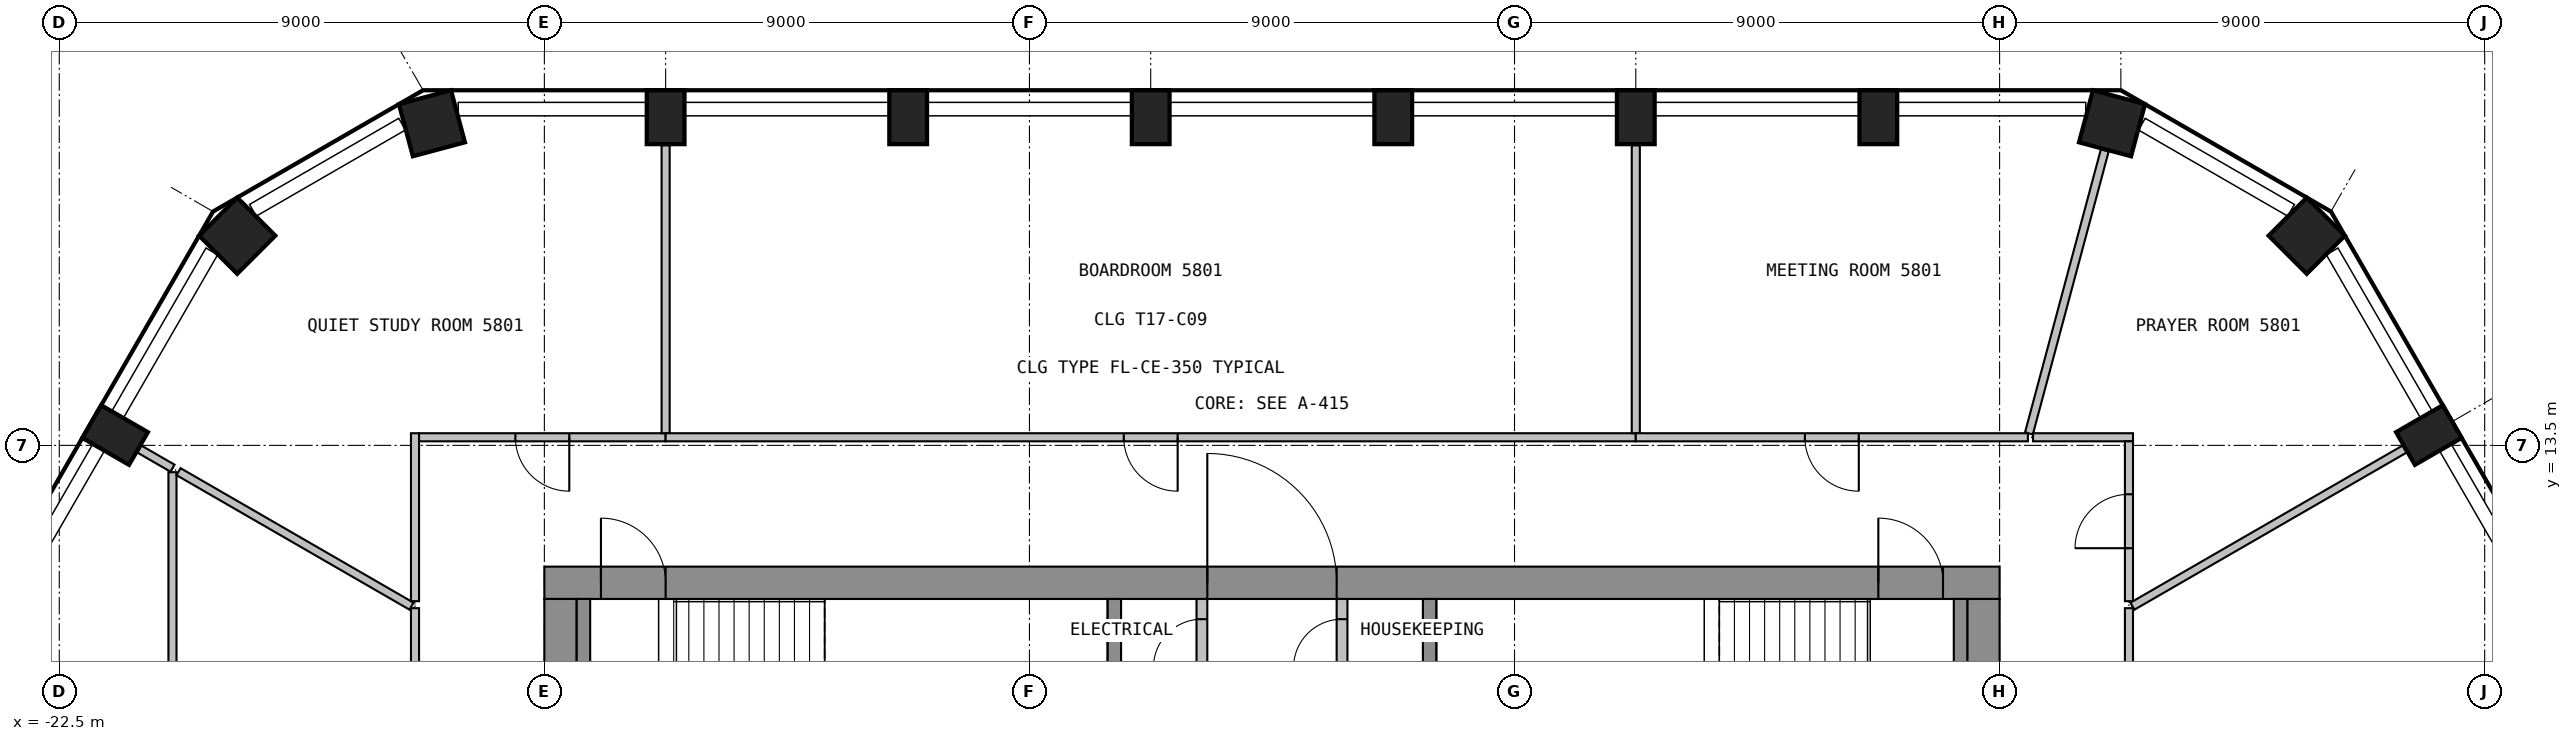
"""IFC4 building model, lengths in metres.
Left out: names, types, materials, properties, quantities, classifications, styles, units other than length and angle.
Written with IfcOpenShell. Run it as: python <this file> out.ifc"""

import sys

from ifc_helpers import new_model, si_unit, direction, frame, frame_2d, origin, origin_2d, place, context, subcontext, project, spatial, rectangle, extrude, element, fill, save


model = new_model("IFC4")
c1 = context("Model", 3, precision=1e-05, world=origin(), true_north=direction((0.0, 1.0)))
c2 = subcontext(c1, "Body", "Model", "MODEL_VIEW")
j1 = project(units=[si_unit("LENGTHUNIT", "METRE"), si_unit("PLANEANGLEUNIT", "RADIAN")], contexts=[c1])
p1 = place(None, origin())
s1 = spatial("IfcSite", under=j1, at=p1, CompositionType="ELEMENT")
p2 = place(p1, origin())
s2 = spatial("IfcBuilding", under=s1, at=p2, CompositionType="ELEMENT")
p3 = place(p2, frame((0.0, 0.0, 235.2)))
s3 = spatial("IfcBuildingStorey", under=s2, at=p3, CompositionType="ELEMENT", Elevation=235.2)
p4 = place(p3, frame((21.464, 13.691, 0.0), z_axis=(0.0, 0.0, 1.0), x_axis=(-0.5, 0.866025403784, 0.0)))
e1 = element("IfcColumn", 1, at=p4, inside=s3, PredefinedType="COLUMN", context=c2, shape_type="SweptSolid", body=[
    extrude(rectangle(XDim=0.7, YDim=1.0, at=origin_2d()), origin(), (0.0, 0.0, 1.0), 3.575),
])
for number, where, z_axis, x_axis in (
    (2, (19.199, 17.39, 0.0), (0.0, 0.0, 1.0), (-0.707, 0.707, 0.0)),
    (3, (15.586, 19.476, 0.0), (0.0, 0.0, 1.0), (-0.966, 0.259, 0.0)),
):
    element("IfcColumn", number, at=place(p3, frame(where, z_axis=z_axis, x_axis=x_axis)), inside=s3, PredefinedType="COLUMN", context=c2, shape_type="SweptSolid", body=[
        extrude(rectangle(XDim=1.0, YDim=1.0, at=origin_2d()), origin(), (0.0, 0.0, 1.0), 3.575),
    ])
for number, where, z_axis, x_axis in (
    (4, (11.25, 19.588, 0.0), (0.0, 0.0, 1.0), (-1.0, 0.0, 0.0)),
    (5, (6.75, 19.588, 0.0), (0.0, 0.0, 1.0), (-1.0, 0.0, 0.0)),
    (6, (2.25, 19.588, 0.0), (0.0, 0.0, 1.0), (-1.0, 0.0, 0.0)),
    (7, (-2.25, 19.588, 0.0), (0.0, 0.0, 1.0), (-1.0, 0.0, 0.0)),
    (8, (-6.75, 19.588, 0.0), (0.0, 0.0, 1.0), (-1.0, 0.0, 0.0)),
    (9, (-11.25, 19.588, 0.0), (0.0, 0.0, 1.0), (-1.0, 0.0, 0.0)),
):
    element("IfcColumn", number, at=place(p3, frame(where, z_axis=z_axis, x_axis=x_axis)), inside=s3, PredefinedType="COLUMN", context=c2, shape_type="SweptSolid", body=[
        extrude(rectangle(XDim=0.7, YDim=1.0, at=origin_2d()), origin(), (0.0, 0.0, 1.0), 3.575),
    ])
for number, where, z_axis, x_axis in (
    (10, (-15.586, 19.476, 0.0), (0.0, 0.0, 1.0), (-0.966, -0.259, 0.0)),
    (11, (-19.199, 17.39, 0.0), (0.0, 0.0, 1.0), (-0.707, -0.707, 0.0)),
):
    element("IfcColumn", number, at=place(p3, frame(where, z_axis=z_axis, x_axis=x_axis)), inside=s3, PredefinedType="COLUMN", context=c2, shape_type="SweptSolid", body=[
        extrude(rectangle(XDim=1.0, YDim=1.0, at=origin_2d()), origin(), (0.0, 0.0, 1.0), 3.575),
    ])
p5 = place(p3, frame((-21.464, 13.691, 0.0), z_axis=(0.0, 0.0, 1.0), x_axis=(-0.5, -0.866025403784, 0.0)))
e12 = element("IfcColumn", 12, at=p5, inside=s3, PredefinedType="COLUMN", context=c2, shape_type="SweptSolid", body=[
    extrude(rectangle(XDim=0.7, YDim=1.0, at=origin_2d()), origin(), (0.0, 0.0, 1.0), 3.575),
])
p6 = place(p3, frame((-13.5, 10.95, 0.0), z_axis=(0.0, 0.0, 1.0), x_axis=(1.0, 0.0, 0.0)))
e13 = element("IfcWall", 13, at=p6, inside=s3, PredefinedType="SHEAR", context=c2, shape_type="SweptSolid", body=[
    extrude(rectangle(XDim=27.0, YDim=0.6, at=frame_2d((13.5, 0.0))), origin(), (0.0, 0.0, 1.0), 3.575),
])
p7 = place(p6, frame((12.3, 0.0, 0.0)))
e14 = element("IfcOpeningElement", 14, at=p7, cuts=e13, PredefinedType="OPENING", context=c2, shape_type="SweptSolid", body=[
    extrude(rectangle(XDim=2.4, YDim=2.1, at=frame_2d((1.2, 1.05))), frame((0.0, 0.31, 0.0), z_axis=(0.0, -1.0, 0.0), x_axis=(1.0, 0.0, 0.0)), (0.0, 0.0, 1.0), 0.62),
])
p8 = place(p6, frame((1.05, 0.0, 0.0)))
e15 = element("IfcOpeningElement", 15, at=p8, cuts=e13, PredefinedType="OPENING", context=c2, shape_type="SweptSolid", body=[
    extrude(rectangle(XDim=1.2, YDim=2.1, at=frame_2d((0.6, 1.05))), frame((0.0, 0.31, 0.0), z_axis=(0.0, -1.0, 0.0), x_axis=(1.0, 0.0, 0.0)), (0.0, 0.0, 1.0), 0.62),
])
p9 = place(p6, frame((24.75, 0.0, 0.0)))
e16 = element("IfcOpeningElement", 16, at=p9, cuts=e13, PredefinedType="OPENING", context=c2, shape_type="SweptSolid", body=[
    extrude(rectangle(XDim=1.2, YDim=2.1, at=frame_2d((0.6, 1.05))), frame((0.0, 0.31, 0.0), z_axis=(0.0, -1.0, 0.0), x_axis=(1.0, 0.0, 0.0)), (0.0, 0.0, 1.0), 0.62),
])
p10 = place(p3, frame((-13.2, -10.65, 0.0), z_axis=(0.0, 0.0, 1.0), x_axis=(0.0, 1.0, 0.0)))
e17 = element("IfcWall", 17, at=p10, inside=s3, PredefinedType="SHEAR", context=c2, shape_type="SweptSolid", body=[
    extrude(rectangle(XDim=21.3, YDim=0.6, at=frame_2d((10.65, 0.0))), origin(), (0.0, 0.0, 1.0), 3.575),
])
p11 = place(p10, frame((9.45, 0.0, 0.0)))
e18 = element("IfcOpeningElement", 18, at=p11, cuts=e17, PredefinedType="OPENING", context=c2, shape_type="SweptSolid", body=[
    extrude(rectangle(XDim=2.4, YDim=2.1, at=frame_2d((1.2, 1.05))), frame((0.0, 0.31, 0.0), z_axis=(0.0, -1.0, 0.0), x_axis=(1.0, 0.0, 0.0)), (0.0, 0.0, 1.0), 0.62),
])
p12 = place(p3, frame((13.2, -10.65, 0.0), z_axis=(0.0, 0.0, 1.0), x_axis=(0.0, 1.0, 0.0)))
e19 = element("IfcWall", 19, at=p12, inside=s3, PredefinedType="SHEAR", context=c2, shape_type="SweptSolid", body=[
    extrude(rectangle(XDim=21.3, YDim=0.6, at=frame_2d((10.65, 0.0))), origin(), (0.0, 0.0, 1.0), 3.575),
])
p13 = place(p12, frame((9.45, 0.0, 0.0)))
e20 = element("IfcOpeningElement", 20, at=p13, cuts=e19, PredefinedType="OPENING", context=c2, shape_type="SweptSolid", body=[
    extrude(rectangle(XDim=2.4, YDim=2.1, at=frame_2d((1.2, 1.05))), frame((0.0, 0.31, 0.0), z_axis=(0.0, -1.0, 0.0), x_axis=(1.0, 0.0, 0.0)), (0.0, 0.0, 1.0), 0.62),
])
for number, where, z_axis, x_axis in (
    (21, (-12.775, 7.4, 0.0), (0.0, 0.0, 1.0), (0.0, 1.0, 0.0)),
    (22, (-2.925, 7.4, 0.0), (0.0, 0.0, 1.0), (0.0, 1.0, 0.0)),
    (23, (2.925, 7.4, 0.0), (0.0, 0.0, 1.0), (0.0, 1.0, 0.0)),
    (24, (12.775, 7.4, 0.0), (0.0, 0.0, 1.0), (0.0, 1.0, 0.0)),
):
    element("IfcWall", number, at=place(p3, frame(where, z_axis=z_axis, x_axis=x_axis)), inside=s3, PredefinedType="SHEAR", context=c2, shape_type="SweptSolid", body=[
        extrude(rectangle(XDim=3.25, YDim=0.25, at=frame_2d((1.625, 0.0))), origin(), (0.0, 0.0, 1.0), 3.575),
    ])
p14 = place(p3, frame((-1.3, 7.15, 0.0), z_axis=(0.0, 0.0, 1.0), x_axis=(0.0, 1.0, 0.0)))
e25 = element("IfcWall", 25, at=p14, inside=s3, PredefinedType="PARTITIONING", context=c2, shape_type="SweptSolid", body=[
    extrude(rectangle(XDim=3.5, YDim=0.2, at=frame_2d((1.75, 0.0))), origin(), (0.0, 0.0, 1.0), 3.575),
])
p15 = place(p14, frame((0.575, 0.0, 0.0)))
e26 = element("IfcOpeningElement", 26, at=p15, cuts=e25, PredefinedType="OPENING", context=c2, shape_type="SweptSolid", body=[
    extrude(rectangle(XDim=0.9, YDim=2.1, at=frame_2d((0.45, 1.05))), frame((0.0, 0.11, 0.0), z_axis=(0.0, -1.0, 0.0), x_axis=(1.0, 0.0, 0.0)), (0.0, 0.0, 1.0), 0.22),
])
p16 = place(p14, frame((2.225, 0.0, 0.0)))
e27 = element("IfcOpeningElement", 27, at=p16, cuts=e25, PredefinedType="OPENING", context=c2, shape_type="SweptSolid", body=[
    extrude(rectangle(XDim=0.9, YDim=2.1, at=frame_2d((0.45, 1.05))), frame((0.0, 0.11, 0.0), z_axis=(0.0, -1.0, 0.0), x_axis=(1.0, 0.0, 0.0)), (0.0, 0.0, 1.0), 0.22),
])
p17 = place(p3, frame((1.3, 7.15, 0.0), z_axis=(0.0, 0.0, 1.0), x_axis=(0.0, 1.0, 0.0)))
e28 = element("IfcWall", 28, at=p17, inside=s3, PredefinedType="PARTITIONING", context=c2, shape_type="SweptSolid", body=[
    extrude(rectangle(XDim=3.5, YDim=0.2, at=frame_2d((1.75, 0.0))), origin(), (0.0, 0.0, 1.0), 3.575),
])
p18 = place(p17, frame((0.575, 0.0, 0.0)))
e29 = element("IfcOpeningElement", 29, at=p18, cuts=e28, PredefinedType="OPENING", context=c2, shape_type="SweptSolid", body=[
    extrude(rectangle(XDim=0.9, YDim=2.1, at=frame_2d((0.45, 1.05))), frame((0.0, 0.11, 0.0), z_axis=(0.0, -1.0, 0.0), x_axis=(1.0, 0.0, 0.0)), (0.0, 0.0, 1.0), 0.22),
])
p19 = place(p17, frame((2.225, 0.0, 0.0)))
e30 = element("IfcOpeningElement", 30, at=p19, cuts=e28, PredefinedType="OPENING", context=c2, shape_type="SweptSolid", body=[
    extrude(rectangle(XDim=0.9, YDim=2.1, at=frame_2d((0.45, 1.05))), frame((0.0, 0.11, 0.0), z_axis=(0.0, -1.0, 0.0), x_axis=(1.0, 0.0, 0.0)), (0.0, 0.0, 1.0), 0.22),
])
p20 = place(p3, frame((-21.014, 13.431, 0.0), z_axis=(0.0, 0.0, 1.0), x_axis=(0.866030760678, -0.499990721473, 0.0)))
e31 = element("IfcWall", 31, at=p20, inside=s3, PredefinedType="PARTITIONING", context=c2, shape_type="SweptSolid", body=[
    extrude(rectangle(XDim=0.709, YDim=0.15, at=frame_2d((0.354, 0.0))), origin(), (0.0, 0.0, 1.0), 3.575),
])
p21 = place(p3, frame((-20.4, 13.002, 0.0), z_axis=(0.0, 0.0, 1.0), x_axis=(0.0, -1.0, 0.0)))
e32 = element("IfcWall", 32, at=p21, inside=s3, PredefinedType="PARTITIONING", context=c2, shape_type="SweptSolid", body=[
    extrude(rectangle(XDim=10.677, YDim=0.15, at=frame_2d((5.338, 0.0))), origin(), (0.0, 0.0, 1.0), 3.575),
])
p22 = place(p3, frame((-20.287, 13.012, 0.0), z_axis=(0.0, 0.0, 1.0), x_axis=(0.866034070548, -0.499984988425, 0.0)))
e33 = element("IfcWall", 33, at=p22, inside=s3, PredefinedType="PARTITIONING", context=c2, shape_type="SweptSolid", body=[
    extrude(rectangle(XDim=4.991, YDim=0.15, at=frame_2d((2.496, 0.0))), origin(), (0.0, 0.0, 1.0), 3.575),
])
p23 = place(p3, frame((-15.9, 10.479, 0.0), z_axis=(0.0, 0.0, 1.0), x_axis=(0.0, -1.0, 0.0)))
e34 = element("IfcWall", 34, at=p23, inside=s3, PredefinedType="PARTITIONING", context=c2, shape_type="SweptSolid", body=[
    extrude(rectangle(XDim=8.154, YDim=0.15, at=frame_2d((4.077, 0.0))), origin(), (0.0, 0.0, 1.0), 3.575),
])
p24 = place(p23, frame((3.577, 0.0, 0.0)))
e35 = element("IfcOpeningElement", 35, at=p24, cuts=e34, PredefinedType="OPENING", context=c2, shape_type="SweptSolid", body=[
    extrude(rectangle(XDim=1.0, YDim=2.1, at=frame_2d((0.5, 1.05))), frame((0.0, 0.085, 0.0), z_axis=(0.0, -1.0, 0.0), x_axis=(1.0, 0.0, 0.0)), (0.0, 0.0, 1.0), 0.17),
])
p25 = place(p3, frame((-15.9, 13.725, 0.0), z_axis=(0.0, 0.0, 1.0), x_axis=(0.0, -1.0, 0.0)))
e36 = element("IfcWall", 36, at=p25, inside=s3, PredefinedType="PARTITIONING", context=c2, shape_type="SweptSolid", body=[
    extrude(rectangle(XDim=3.116, YDim=0.15, at=frame_2d((1.558, 0.0))), origin(), (0.0, 0.0, 1.0), 3.575),
])
p26 = place(p3, frame((-11.25, 13.65, 0.0), z_axis=(0.0, 0.0, 1.0), x_axis=(-1.0, 0.0, 0.0)))
e37 = element("IfcWall", 37, at=p26, inside=s3, PredefinedType="PARTITIONING", context=c2, shape_type="SweptSolid", body=[
    extrude(rectangle(XDim=4.575, YDim=0.15, at=frame_2d((2.288, 0.0))), origin(), (0.0, 0.0, 1.0), 3.575),
])
p27 = place(p26, frame((1.788, 0.0, 0.0)))
e38 = element("IfcOpeningElement", 38, at=p27, cuts=e37, PredefinedType="OPENING", context=c2, shape_type="SweptSolid", body=[
    extrude(rectangle(XDim=1.0, YDim=2.1, at=frame_2d((0.5, 1.05))), frame((0.0, 0.085, 0.0), z_axis=(0.0, -1.0, 0.0), x_axis=(1.0, 0.0, 0.0)), (0.0, 0.0, 1.0), 0.17),
])
p28 = place(p3, frame((-11.25, 19.069, 0.0), z_axis=(0.0, 0.0, 1.0), x_axis=(0.0, -1.0, 0.0)))
e39 = element("IfcWall", 39, at=p28, inside=s3, PredefinedType="PARTITIONING", context=c2, shape_type="SweptSolid", body=[
    extrude(rectangle(XDim=5.344, YDim=0.15, at=frame_2d((2.672, 0.0))), origin(), (0.0, 0.0, 1.0), 3.575),
])
p29 = place(p3, frame((6.75, 13.65, 0.0), z_axis=(0.0, 0.0, 1.0), x_axis=(-1.0, 0.0, 0.0)))
e40 = element("IfcWall", 40, at=p29, inside=s3, PredefinedType="PARTITIONING", context=c2, shape_type="SweptSolid", body=[
    extrude(rectangle(XDim=18.0, YDim=0.15, at=frame_2d((9.0, 0.0))), origin(), (0.0, 0.0, 1.0), 3.575),
])
p30 = place(p29, frame((8.5, 0.0, 0.0)))
e41 = element("IfcOpeningElement", 41, at=p30, cuts=e40, PredefinedType="OPENING", context=c2, shape_type="SweptSolid", body=[
    extrude(rectangle(XDim=1.0, YDim=2.1, at=frame_2d((0.5, 1.05))), frame((0.0, 0.085, 0.0), z_axis=(0.0, -1.0, 0.0), x_axis=(1.0, 0.0, 0.0)), (0.0, 0.0, 1.0), 0.17),
])
p31 = place(p3, frame((6.75, 19.069, 0.0), z_axis=(0.0, 0.0, 1.0), x_axis=(0.0, -1.0, 0.0)))
e42 = element("IfcWall", 42, at=p31, inside=s3, PredefinedType="PARTITIONING", context=c2, shape_type="SweptSolid", body=[
    extrude(rectangle(XDim=5.344, YDim=0.15, at=frame_2d((2.672, 0.0))), origin(), (0.0, 0.0, 1.0), 3.575),
])
p32 = place(p3, frame((14.025, 13.65, 0.0), z_axis=(0.0, 0.0, 1.0), x_axis=(-1.0, 0.0, 0.0)))
e43 = element("IfcWall", 43, at=p32, inside=s3, PredefinedType="PARTITIONING", context=c2, shape_type="SweptSolid", body=[
    extrude(rectangle(XDim=7.275, YDim=0.15, at=frame_2d((3.637, 0.0))), origin(), (0.0, 0.0, 1.0), 3.575),
])
p33 = place(p32, frame((3.137, 0.0, 0.0)))
e44 = element("IfcOpeningElement", 44, at=p33, cuts=e43, PredefinedType="OPENING", context=c2, shape_type="SweptSolid", body=[
    extrude(rectangle(XDim=1.0, YDim=2.1, at=frame_2d((0.5, 1.05))), frame((0.0, 0.085, 0.0), z_axis=(0.0, -1.0, 0.0), x_axis=(1.0, 0.0, 0.0)), (0.0, 0.0, 1.0), 0.17),
])
p34 = place(p3, frame((15.452, 18.974, 0.0), z_axis=(0.0, 0.0, 1.0), x_axis=(-0.258889468925, -0.965906953531, 0.0)))
e45 = element("IfcWall", 45, at=p34, inside=s3, PredefinedType="PARTITIONING", context=c2, shape_type="SweptSolid", body=[
    extrude(rectangle(XDim=5.437, YDim=0.15, at=frame_2d((2.718, 0.0))), origin(), (0.0, 0.0, 1.0), 3.575),
])
p35 = place(p3, frame((15.975, 13.65, 0.0), z_axis=(0.0, 0.0, 1.0), x_axis=(-1.0, 0.0, 0.0)))
e46 = element("IfcWall", 46, at=p35, inside=s3, PredefinedType="PARTITIONING", context=c2, shape_type="SweptSolid", body=[
    extrude(rectangle(XDim=1.855, YDim=0.15, at=frame_2d((0.927, 0.0))), origin(), (0.0, 0.0, 1.0), 3.575),
])
p36 = place(p3, frame((15.9, 1.166, 0.0), z_axis=(0.0, 0.0, 1.0), x_axis=(0.0, 1.0, 0.0)))
e47 = element("IfcWall", 47, at=p36, inside=s3, PredefinedType="PARTITIONING", context=c2, shape_type="SweptSolid", body=[
    extrude(rectangle(XDim=9.313, YDim=0.15, at=frame_2d((4.656, 0.0))), origin(), (0.0, 0.0, 1.0), 3.575),
])
p37 = place(p36, frame((4.156, 0.0, 0.0)))
e48 = element("IfcOpeningElement", 48, at=p37, cuts=e47, PredefinedType="OPENING", context=c2, shape_type="SweptSolid", body=[
    extrude(rectangle(XDim=1.0, YDim=2.1, at=frame_2d((0.5, 1.05))), frame((0.0, 0.085, 0.0), z_axis=(0.0, -1.0, 0.0), x_axis=(1.0, 0.0, 0.0)), (0.0, 0.0, 1.0), 0.17),
])
p38 = place(p3, frame((15.9, 10.609, 0.0), z_axis=(0.0, 0.0, 1.0), x_axis=(0.0, 1.0, 0.0)))
e49 = element("IfcWall", 49, at=p38, inside=s3, PredefinedType="PARTITIONING", context=c2, shape_type="SweptSolid", body=[
    extrude(rectangle(XDim=2.966, YDim=0.15, at=frame_2d((1.483, 0.0))), origin(), (0.0, 0.0, 1.0), 3.575),
])
p39 = place(p38, frame((0.983, 0.0, 0.0)))
e50 = element("IfcOpeningElement", 50, at=p39, cuts=e49, PredefinedType="OPENING", context=c2, shape_type="SweptSolid", body=[
    extrude(rectangle(XDim=1.0, YDim=2.1, at=frame_2d((0.5, 1.05))), frame((0.0, 0.085, 0.0), z_axis=(0.0, -1.0, 0.0), x_axis=(1.0, 0.0, 0.0)), (0.0, 0.0, 1.0), 0.17),
])
p40 = place(p3, frame((21.014, 13.431, 0.0), z_axis=(0.0, 0.0, 1.0), x_axis=(-0.866054481515, -0.499949632511, 0.0)))
e51 = element("IfcWall", 51, at=p40, inside=s3, PredefinedType="PARTITIONING", context=c2, shape_type="SweptSolid", body=[
    extrude(rectangle(XDim=5.83, YDim=0.15, at=frame_2d((2.915, 0.0))), origin(), (0.0, 0.0, 1.0), 3.575),
])
p41 = place(p7, origin())
e52 = element("IfcDoor", 52, at=p41, inside=s3, OperationType="DOUBLE_DOOR_DOUBLE_SWING", PredefinedType="DOOR", context=c2, shape_type="SweptSolid", body=[
    extrude(rectangle(XDim=2.4, YDim=2.1, at=frame_2d((1.2, 1.05))), frame((0.0, 0.025, 0.0), z_axis=(0.0, -1.0, 0.0), x_axis=(1.0, 0.0, 0.0)), (0.0, 0.0, 1.0), 0.05),
])
fill(e14, e52)
p42 = place(p8, origin())
e53 = element("IfcDoor", 53, at=p42, inside=s3, OperationType="SINGLE_SWING_RIGHT", PredefinedType="DOOR", context=c2, shape_type="SweptSolid", body=[
    extrude(rectangle(XDim=1.2, YDim=2.1, at=frame_2d((0.6, 1.05))), frame((0.0, 0.025, 0.0), z_axis=(0.0, -1.0, 0.0), x_axis=(1.0, 0.0, 0.0)), (0.0, 0.0, 1.0), 0.05),
])
fill(e15, e53)
p43 = place(p9, origin())
e54 = element("IfcDoor", 54, at=p43, inside=s3, OperationType="SINGLE_SWING_RIGHT", PredefinedType="DOOR", context=c2, shape_type="SweptSolid", body=[
    extrude(rectangle(XDim=1.2, YDim=2.1, at=frame_2d((0.6, 1.05))), frame((0.0, 0.025, 0.0), z_axis=(0.0, -1.0, 0.0), x_axis=(1.0, 0.0, 0.0)), (0.0, 0.0, 1.0), 0.05),
])
fill(e16, e54)
p44 = place(p16, origin())
e55 = element("IfcDoor", 55, at=p44, inside=s3, OperationType="SINGLE_SWING_LEFT", PredefinedType="DOOR", context=c2, shape_type="SweptSolid", body=[
    extrude(rectangle(XDim=0.9, YDim=2.1, at=frame_2d((0.45, 1.05))), frame((0.0, 0.025, 0.0), z_axis=(0.0, -1.0, 0.0), x_axis=(1.0, 0.0, 0.0)), (0.0, 0.0, 1.0), 0.05),
])
fill(e27, e55)
p45 = place(p19, origin())
e56 = element("IfcDoor", 56, at=p45, inside=s3, OperationType="SINGLE_SWING_LEFT", PredefinedType="DOOR", context=c2, shape_type="SweptSolid", body=[
    extrude(rectangle(XDim=0.9, YDim=2.1, at=frame_2d((0.45, 1.05))), frame((0.0, 0.025, 0.0), z_axis=(0.0, -1.0, 0.0), x_axis=(1.0, 0.0, 0.0)), (0.0, 0.0, 1.0), 0.05),
])
fill(e30, e56)
p46 = place(p27, origin())
e57 = element("IfcDoor", 57, at=p46, inside=s3, OperationType="SINGLE_SWING_LEFT", PredefinedType="DOOR", context=c2, shape_type="SweptSolid", body=[
    extrude(rectangle(XDim=1.0, YDim=2.1, at=frame_2d((0.5, 1.05))), frame((0.0, 0.025, 0.0), z_axis=(0.0, -1.0, 0.0), x_axis=(1.0, 0.0, 0.0)), (0.0, 0.0, 1.0), 0.05),
])
fill(e38, e57)
p47 = place(p30, origin())
e58 = element("IfcDoor", 58, at=p47, inside=s3, OperationType="SINGLE_SWING_RIGHT", PredefinedType="DOOR", context=c2, shape_type="SweptSolid", body=[
    extrude(rectangle(XDim=1.0, YDim=2.1, at=frame_2d((0.5, 1.05))), frame((0.0, 0.025, 0.0), z_axis=(0.0, -1.0, 0.0), x_axis=(1.0, 0.0, 0.0)), (0.0, 0.0, 1.0), 0.05),
])
fill(e41, e58)
p48 = place(p33, origin())
e59 = element("IfcDoor", 59, at=p48, inside=s3, OperationType="SINGLE_SWING_RIGHT", PredefinedType="DOOR", context=c2, shape_type="SweptSolid", body=[
    extrude(rectangle(XDim=1.0, YDim=2.1, at=frame_2d((0.5, 1.05))), frame((0.0, 0.025, 0.0), z_axis=(0.0, -1.0, 0.0), x_axis=(1.0, 0.0, 0.0)), (0.0, 0.0, 1.0), 0.05),
])
fill(e44, e59)
p49 = place(p39, origin())
e60 = element("IfcDoor", 60, at=p49, inside=s3, OperationType="SINGLE_SWING_RIGHT", PredefinedType="DOOR", context=c2, shape_type="SweptSolid", body=[
    extrude(rectangle(XDim=1.0, YDim=2.1, at=frame_2d((0.5, 1.05))), frame((0.0, 0.025, 0.0), z_axis=(0.0, -1.0, 0.0), x_axis=(1.0, 0.0, 0.0)), (0.0, 0.0, 1.0), 0.05),
])
fill(e50, e60)
save(model, sys.argv[1])
